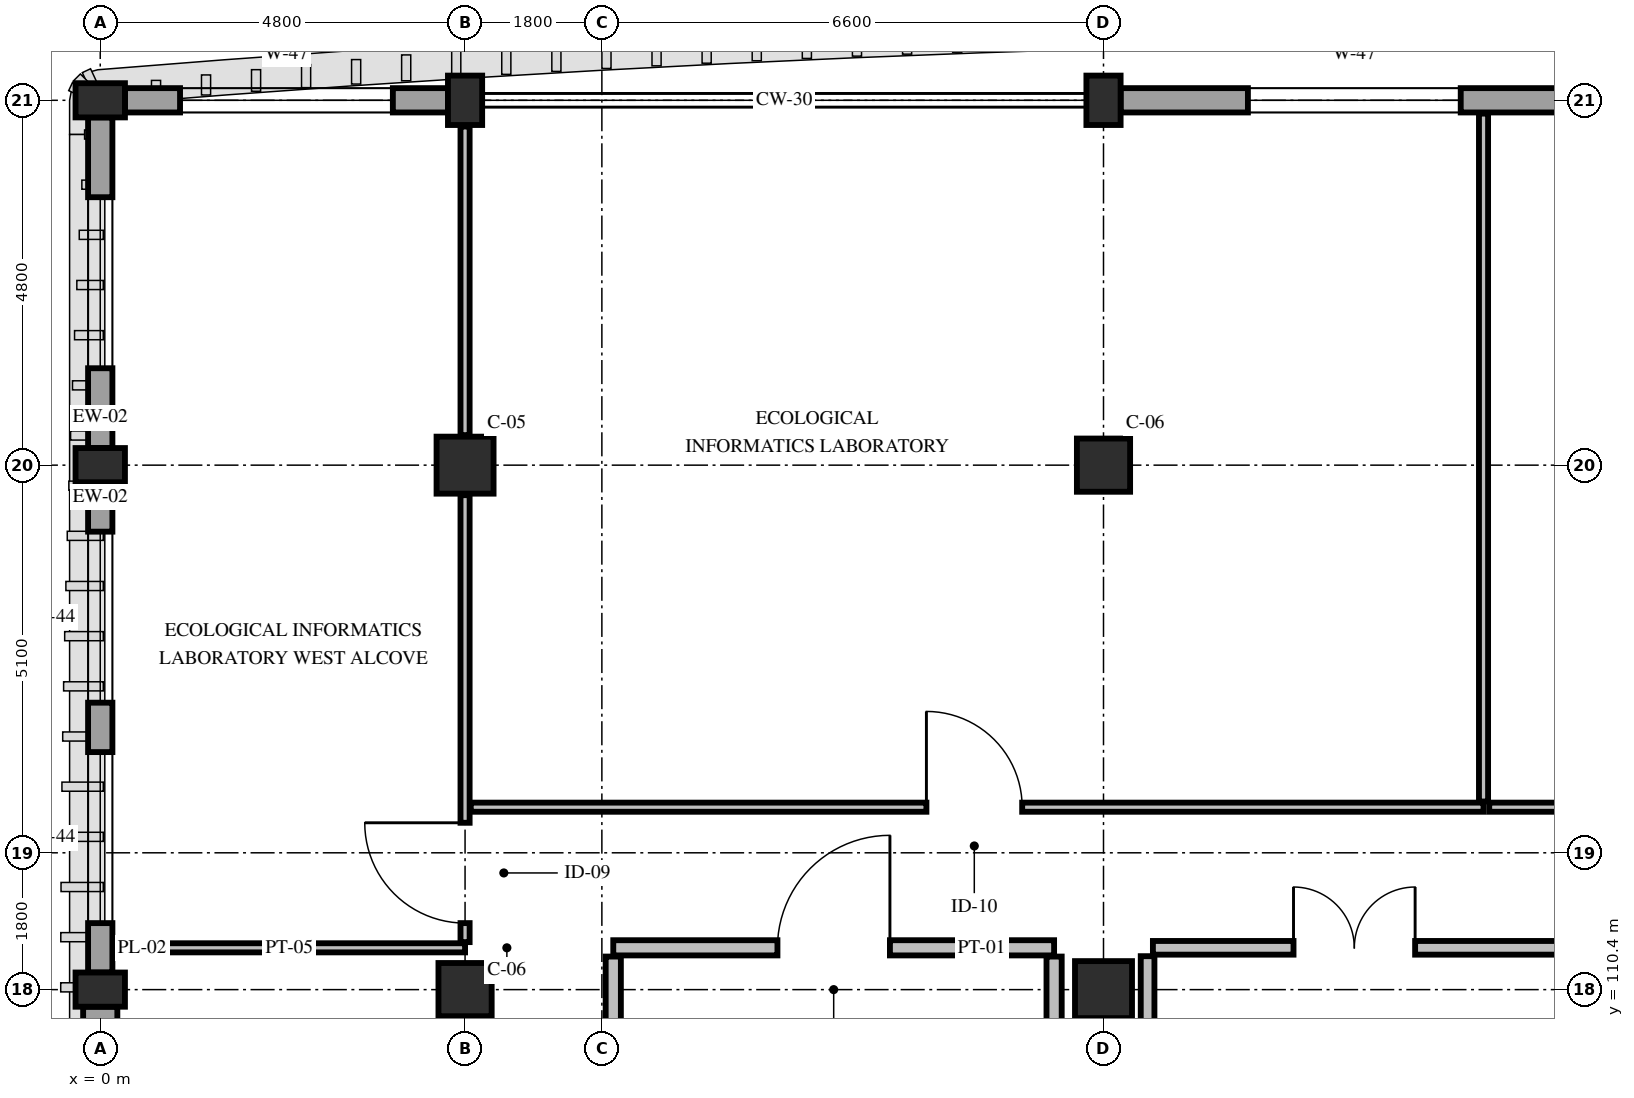
"""IFC4 building model, lengths in metres.
Left out: names, types, materials, properties, quantities, classifications, styles, units other than length and angle.
Written with IfcOpenShell. Run it as: python <this file> out.ifc"""

import sys

from ifc_helpers import new_model, si_unit, direction, frame, frame_2d, origin, origin_2d, place, context, subcontext, project, spatial, rectangle, extrude, element, fill, save


model = new_model("IFC4")
c1 = context("Model", 3, precision=1e-05, world=origin(), true_north=direction((0.0, 1.0)))
c2 = subcontext(c1, "Body", "Model", "MODEL_VIEW")
j1 = project(units=[si_unit("LENGTHUNIT", "METRE"), si_unit("PLANEANGLEUNIT", "RADIAN")], contexts=[c1])
p1 = place(None, origin())
s1 = spatial("IfcSite", under=j1, at=p1, CompositionType="ELEMENT")
p2 = place(p1, origin())
s2 = spatial("IfcBuilding", under=s1, at=p2, CompositionType="ELEMENT")
p3 = place(p2, frame((0.0, 0.0, 29.4)))
s3 = spatial("IfcBuildingStorey", under=s2, at=p3, CompositionType="ELEMENT", Elevation=29.4)
for number, where, z_axis, x_axis in (
    (1, (0.0, 110.4, 0.0), (0.0, 0.0, 1.0), (0.0, 1.0, 0.0)),
    (2, (0.0, 117.3, 0.0), (0.0, 0.0, 1.0), (0.0, 1.0, 0.0)),
    (3, (0.0, 122.1, 0.0), (0.0, 0.0, 1.0), (0.0, 1.0, 0.0)),
):
    element("IfcColumn", number, at=place(p3, frame(where, z_axis=z_axis, x_axis=x_axis)), inside=s3, PredefinedType="PILASTER", context=c2, shape_type="SweptSolid", body=[
        extrude(rectangle(XDim=0.45, YDim=0.65, at=origin_2d()), origin(), (0.0, 0.0, 1.0), 4.8),
    ])
p4 = place(p3, frame((4.8, 110.4, 0.0), z_axis=(0.0, 0.0, 1.0), x_axis=(1.0, 0.0, 0.0)))
e4 = element("IfcColumn", 4, at=p4, inside=s3, PredefinedType="COLUMN", context=c2, shape_type="SweptSolid", body=[
    extrude(rectangle(XDim=0.7, YDim=0.7, at=origin_2d()), origin(), (0.0, 0.0, 1.0), 4.8),
])
p5 = place(p3, frame((4.8, 117.3, 0.0), z_axis=(0.0, 0.0, 1.0), x_axis=(1.0, 0.0, 0.0)))
e5 = element("IfcColumn", 5, at=p5, inside=s3, PredefinedType="COLUMN", context=c2, shape_type="SweptSolid", body=[
    extrude(rectangle(XDim=0.75, YDim=0.75, at=origin_2d()), origin(), (0.0, 0.0, 1.0), 4.8),
])
p6 = place(p3, frame((4.8, 122.1, 0.0), z_axis=(0.0, 0.0, 1.0), x_axis=(1.0, 0.0, 0.0)))
e6 = element("IfcColumn", 6, at=p6, inside=s3, PredefinedType="PILASTER", context=c2, shape_type="SweptSolid", body=[
    extrude(rectangle(XDim=0.45, YDim=0.65, at=origin_2d()), origin(), (0.0, 0.0, 1.0), 4.8),
])
p7 = place(p3, frame((13.2, 110.4, 0.0), z_axis=(0.0, 0.0, 1.0), x_axis=(1.0, 0.0, 0.0)))
e7 = element("IfcColumn", 7, at=p7, inside=s3, PredefinedType="COLUMN", context=c2, shape_type="SweptSolid", body=[
    extrude(rectangle(XDim=0.75, YDim=0.75, at=origin_2d()), origin(), (0.0, 0.0, 1.0), 4.8),
])
p8 = place(p3, frame((13.2, 117.3, 0.0), z_axis=(0.0, 0.0, 1.0), x_axis=(1.0, 0.0, 0.0)))
e8 = element("IfcColumn", 8, at=p8, inside=s3, PredefinedType="COLUMN", context=c2, shape_type="SweptSolid", body=[
    extrude(rectangle(XDim=0.7, YDim=0.7, at=origin_2d()), origin(), (0.0, 0.0, 1.0), 4.8),
])
p9 = place(p3, frame((13.2, 122.1, 0.0), z_axis=(0.0, 0.0, 1.0), x_axis=(1.0, 0.0, 0.0)))
e9 = element("IfcColumn", 9, at=p9, inside=s3, PredefinedType="PILASTER", context=c2, shape_type="SweptSolid", body=[
    extrude(rectangle(XDim=0.45, YDim=0.65, at=origin_2d()), origin(), (0.0, 0.0, 1.0), 4.8),
])
p10 = place(p3, frame((0.0, 104.025, 0.0), z_axis=(0.0, 0.0, 1.0), x_axis=(0.0, 1.0, 0.0)))
e10 = element("IfcWall", 10, at=p10, inside=s3, PredefinedType="SOLIDWALL", context=c2, shape_type="SweptSolid", body=[
    extrude(rectangle(XDim=6.15, YDim=0.45, at=frame_2d((3.075, 0.0))), origin(), (0.0, 0.0, 1.0), 3.95),
])
p11 = place(p3, frame((0.0, 110.625, 0.0), z_axis=(0.0, 0.0, 1.0), x_axis=(0.0, 1.0, 0.0)))
e11 = element("IfcWall", 11, at=p11, inside=s3, PredefinedType="STANDARD", context=c2, shape_type="SweptSolid", body=[
    extrude(rectangle(XDim=6.45, YDim=0.32, at=frame_2d((3.225, 0.0))), origin(), (0.0, 0.0, 1.0), 3.95),
])
p12 = place(p11, frame((0.65, 0.0, 0.85)))
e12 = element("IfcOpeningElement", 12, at=p12, cuts=e11, PredefinedType="OPENING", context=c2, shape_type="SweptSolid", body=[
    extrude(rectangle(XDim=2.25, YDim=2.24, at=frame_2d((1.125, 1.12))), frame((0.0, 0.175, 0.0), z_axis=(0.0, -1.0, 0.0), x_axis=(1.0, 0.0, 0.0)), (0.0, 0.0, 1.0), 0.35),
])
p13 = place(p11, frame((3.55, 0.0, 0.85)))
e13 = element("IfcOpeningElement", 13, at=p13, cuts=e11, PredefinedType="OPENING", context=c2, shape_type="SweptSolid", body=[
    extrude(rectangle(XDim=2.25, YDim=2.24, at=frame_2d((1.125, 1.12))), frame((0.0, 0.175, 0.0), z_axis=(0.0, -1.0, 0.0), x_axis=(1.0, 0.0, 0.0)), (0.0, 0.0, 1.0), 0.35),
])
p14 = place(p3, frame((0.0, 117.525, 0.0), z_axis=(0.0, 0.0, 1.0), x_axis=(0.0, 1.0, 0.0)))
e14 = element("IfcWall", 14, at=p14, inside=s3, PredefinedType="STANDARD", context=c2, shape_type="SweptSolid", body=[
    extrude(rectangle(XDim=4.35, YDim=0.32, at=frame_2d((2.175, 0.0))), origin(), (0.0, 0.0, 1.0), 3.95),
])
p15 = place(p14, frame((1.05, 0.0, 0.85)))
e15 = element("IfcOpeningElement", 15, at=p15, cuts=e14, PredefinedType="OPENING", context=c2, shape_type="SweptSolid", body=[
    extrude(rectangle(XDim=2.25, YDim=2.24, at=frame_2d((1.125, 1.12))), frame((0.0, 0.175, 0.0), z_axis=(0.0, -1.0, 0.0), x_axis=(1.0, 0.0, 0.0)), (0.0, 0.0, 1.0), 0.35),
])
p16 = place(p3, frame((0.325, 122.1, 0.0), z_axis=(0.0, 0.0, 1.0), x_axis=(1.0, 0.0, 0.0)))
e16 = element("IfcWall", 16, at=p16, inside=s3, PredefinedType="STANDARD", context=c2, shape_type="SweptSolid", body=[
    extrude(rectangle(XDim=4.25, YDim=0.32, at=frame_2d((2.125, 0.0))), origin(), (0.0, 0.0, 1.0), 3.95),
])
p17 = place(p16, frame((0.725, 0.0, 0.85)))
e17 = element("IfcOpeningElement", 17, at=p17, cuts=e16, PredefinedType="OPENING", context=c2, shape_type="SweptSolid", body=[
    extrude(rectangle(XDim=2.8, YDim=2.08, at=frame_2d((1.4, 1.04))), frame((0.0, 0.175, 0.0), z_axis=(0.0, -1.0, 0.0), x_axis=(1.0, 0.0, 0.0)), (0.0, 0.0, 1.0), 0.35),
])
p18 = place(p3, frame((13.425, 122.1, 0.0), z_axis=(0.0, 0.0, 1.0), x_axis=(1.0, 0.0, 0.0)))
e18 = element("IfcWall", 18, at=p18, inside=s3, PredefinedType="STANDARD", context=c2, shape_type="SweptSolid", body=[
    extrude(rectangle(XDim=6.15, YDim=0.32, at=frame_2d((3.075, 0.0))), origin(), (0.0, 0.0, 1.0), 3.93),
])
p19 = place(p18, frame((1.675, 0.0, 0.85)))
e19 = element("IfcOpeningElement", 19, at=p19, cuts=e18, PredefinedType="OPENING", context=c2, shape_type="SweptSolid", body=[
    extrude(rectangle(XDim=2.8, YDim=2.08, at=frame_2d((1.4, 1.04))), frame((0.0, 0.175, 0.0), z_axis=(0.0, -1.0, 0.0), x_axis=(1.0, 0.0, 0.0)), (0.0, 0.0, 1.0), 0.35),
])
p20 = place(p3, frame((13.85, 110.95, 0.0), z_axis=(0.0, 0.0, 1.0), x_axis=(1.0, 0.0, 0.0)))
e20 = element("IfcWall", 20, at=p20, inside=s3, PredefinedType="PARTITIONING", context=c2, shape_type="SweptSolid", body=[
    extrude(rectangle(XDim=5.47, YDim=0.18, at=frame_2d((2.735, 0.0))), origin(), (0.0, 0.0, 1.0), 4.345),
])
p21 = place(p20, frame((1.85, 0.0, 0.0)))
e21 = element("IfcOpeningElement", 21, at=p21, cuts=e20, PredefinedType="OPENING", context=c2, shape_type="SweptSolid", body=[
    extrude(rectangle(XDim=1.6, YDim=2.25, at=frame_2d((0.8, 1.125))), frame((0.0, 0.105, 0.0), z_axis=(0.0, -1.0, 0.0), x_axis=(1.0, 0.0, 0.0)), (0.0, 0.0, 1.0), 0.21),
])
p22 = place(p3, frame((13.78, 107.23, 0.0), z_axis=(0.0, 0.0, 1.0), x_axis=(0.0, 1.0, 0.0)))
e22 = element("IfcWall", 22, at=p22, inside=s3, PredefinedType="PARTITIONING", context=c2, shape_type="SweptSolid", body=[
    extrude(rectangle(XDim=3.61, YDim=0.18, at=frame_2d((1.805, 0.0))), origin(), (0.0, 0.0, 1.0), 4.18),
])
p23 = place(p3, frame((6.75, 110.95, 0.0), z_axis=(0.0, 0.0, 1.0), x_axis=(1.0, 0.0, 0.0)))
e23 = element("IfcWall", 23, at=p23, inside=s3, PredefinedType="PARTITIONING", context=c2, shape_type="SweptSolid", body=[
    extrude(rectangle(XDim=5.8, YDim=0.2, at=frame_2d((2.9, 0.0))), origin(), (0.0, 0.0, 1.0), 4.345),
])
p24 = place(p23, frame((2.16, 0.0, 0.0)))
e24 = element("IfcOpeningElement", 24, at=p24, cuts=e23, PredefinedType="OPENING", context=c2, shape_type="SweptSolid", body=[
    extrude(rectangle(XDim=1.48, YDim=2.3, at=frame_2d((0.74, 1.15))), frame((0.0, 0.115, 0.0), z_axis=(0.0, -1.0, 0.0), x_axis=(1.0, 0.0, 0.0)), (0.0, 0.0, 1.0), 0.23),
])
for number, where, z_axis, x_axis in (
    (25, (6.75, 104.615, 0.0), (0.0, 0.0, 1.0), (0.0, 1.0, 0.0)),
    (26, (12.55, 104.615, 0.0), (0.0, 0.0, 1.0), (0.0, 1.0, 0.0)),
):
    element("IfcWall", number, at=place(p3, frame(where, z_axis=z_axis, x_axis=x_axis)), inside=s3, PredefinedType="PARTITIONING", context=c2, shape_type="SweptSolid", body=[
        extrude(rectangle(XDim=6.22, YDim=0.2, at=frame_2d((3.11, 0.0))), origin(), (0.0, 0.0, 1.0), 3.83),
    ])
p25 = place(p3, frame((0.175, 110.95, 0.0), z_axis=(0.0, 0.0, 1.0), x_axis=(1.0, 0.0, 0.0)))
e27 = element("IfcWall", 27, at=p25, inside=s3, PredefinedType="PARTITIONING", context=c2, shape_type="SweptSolid", body=[
    extrude(rectangle(XDim=4.625, YDim=0.12, at=frame_2d((2.312, 0.0))), origin(), (0.0, 0.0, 1.0), 4.08),
])
p26 = place(p3, frame((4.8, 111.025, 0.0), z_axis=(0.0, 0.0, 1.0), x_axis=(0.0, 1.0, 0.0)))
e28 = element("IfcWall", 28, at=p26, inside=s3, PredefinedType="PARTITIONING", context=c2, shape_type="SweptSolid", body=[
    extrude(rectangle(XDim=5.88, YDim=0.12, at=frame_2d((2.94, 0.0))), origin(), (0.0, 0.0, 1.0), 4.08),
])
p27 = place(p26, frame((0.25, 0.0, 0.0)))
e29 = element("IfcOpeningElement", 29, at=p27, cuts=e28, PredefinedType="OPENING", context=c2, shape_type="SweptSolid", body=[
    extrude(rectangle(XDim=1.32, YDim=2.2, at=frame_2d((0.66, 1.1))), frame((0.0, 0.075, 0.0), z_axis=(0.0, -1.0, 0.0), x_axis=(1.0, 0.0, 0.0)), (0.0, 0.0, 1.0), 0.15),
])
p28 = place(p3, frame((4.8, 117.695, 0.0), z_axis=(0.0, 0.0, 1.0), x_axis=(0.0, 1.0, 0.0)))
e30 = element("IfcWall", 30, at=p28, inside=s3, PredefinedType="PARTITIONING", context=c2, shape_type="SweptSolid", body=[
    extrude(rectangle(XDim=4.06, YDim=0.12, at=frame_2d((2.03, 0.0))), origin(), (0.0, 0.0, 1.0), 4.08),
])
p29 = place(p3, frame((4.875, 112.8, 0.0), z_axis=(0.0, 0.0, 1.0), x_axis=(1.0, 0.0, 0.0)))
e31 = element("IfcWall", 31, at=p29, inside=s3, PredefinedType="PARTITIONING", context=c2, shape_type="SweptSolid", body=[
    extrude(rectangle(XDim=13.325, YDim=0.12, at=frame_2d((6.663, 0.0))), origin(), (0.0, 0.0, 1.0), 4.08),
])
p30 = place(p29, frame((5.995, 0.0, 0.0)))
e32 = element("IfcOpeningElement", 32, at=p30, cuts=e31, PredefinedType="OPENING", context=c2, shape_type="SweptSolid", body=[
    extrude(rectangle(XDim=1.26, YDim=2.2, at=frame_2d((0.63, 1.1))), frame((0.0, 0.075, 0.0), z_axis=(0.0, -1.0, 0.0), x_axis=(1.0, 0.0, 0.0)), (0.0, 0.0, 1.0), 0.15),
])
p31 = place(p3, frame((18.2, 112.875, 0.0), z_axis=(0.0, 0.0, 1.0), x_axis=(0.0, 1.0, 0.0)))
e33 = element("IfcWall", 33, at=p31, inside=s3, PredefinedType="PARTITIONING", context=c2, shape_type="SweptSolid", body=[
    extrude(rectangle(XDim=9.05, YDim=0.12, at=frame_2d((4.525, 0.0))), origin(), (0.0, 0.0, 1.0), 3.93),
])
p32 = place(p3, frame((18.275, 112.8, 0.0), z_axis=(0.0, 0.0, 1.0), x_axis=(1.0, 0.0, 0.0)))
e34 = element("IfcWall", 34, at=p32, inside=s3, PredefinedType="PARTITIONING", context=c2, shape_type="SweptSolid", body=[
    extrude(rectangle(XDim=9.325, YDim=0.12, at=frame_2d((4.663, 0.0))), origin(), (0.0, 0.0, 1.0), 4.13),
])
p33 = place(p32, frame((3.905, 0.0, 0.0)))
e35 = element("IfcOpeningElement", 35, at=p33, cuts=e34, PredefinedType="OPENING", context=c2, shape_type="SweptSolid", body=[
    extrude(rectangle(XDim=1.44, YDim=2.25, at=frame_2d((0.72, 1.125))), frame((0.0, 0.075, 0.0), z_axis=(0.0, -1.0, 0.0), x_axis=(1.0, 0.0, 0.0)), (0.0, 0.0, 1.0), 0.15),
])
p34 = place(p12, origin())
e36 = element("IfcWindow", 36, at=p34, inside=s3, PartitioningType="DOUBLE_PANEL_VERTICAL", PredefinedType="WINDOW", context=c2, shape_type="SweptSolid", body=[
    extrude(rectangle(XDim=2.25, YDim=2.24, at=frame_2d((1.125, 1.12))), frame((0.0, 0.03, 0.0), z_axis=(0.0, -1.0, 0.0), x_axis=(1.0, 0.0, 0.0)), (0.0, 0.0, 1.0), 0.06),
])
fill(e12, e36)
p35 = place(p13, origin())
e37 = element("IfcWindow", 37, at=p35, inside=s3, PartitioningType="DOUBLE_PANEL_VERTICAL", PredefinedType="WINDOW", context=c2, shape_type="SweptSolid", body=[
    extrude(rectangle(XDim=2.25, YDim=2.24, at=frame_2d((1.125, 1.12))), frame((0.0, 0.03, 0.0), z_axis=(0.0, -1.0, 0.0), x_axis=(1.0, 0.0, 0.0)), (0.0, 0.0, 1.0), 0.06),
])
fill(e13, e37)
p36 = place(p15, origin())
e38 = element("IfcWindow", 38, at=p36, inside=s3, PartitioningType="DOUBLE_PANEL_VERTICAL", PredefinedType="WINDOW", context=c2, shape_type="SweptSolid", body=[
    extrude(rectangle(XDim=2.25, YDim=2.24, at=frame_2d((1.125, 1.12))), frame((0.0, 0.03, 0.0), z_axis=(0.0, -1.0, 0.0), x_axis=(1.0, 0.0, 0.0)), (0.0, 0.0, 1.0), 0.06),
])
fill(e15, e38)
p37 = place(p17, origin())
e39 = element("IfcWindow", 39, at=p37, inside=s3, PartitioningType="DOUBLE_PANEL_VERTICAL", PredefinedType="WINDOW", context=c2, shape_type="SweptSolid", body=[
    extrude(rectangle(XDim=2.8, YDim=2.08, at=frame_2d((1.4, 1.04))), frame((0.0, 0.03, 0.0), z_axis=(0.0, -1.0, 0.0), x_axis=(1.0, 0.0, 0.0)), (0.0, 0.0, 1.0), 0.06),
])
fill(e17, e39)
p38 = place(p19, origin())
e40 = element("IfcWindow", 40, at=p38, inside=s3, PartitioningType="DOUBLE_PANEL_VERTICAL", PredefinedType="WINDOW", context=c2, shape_type="SweptSolid", body=[
    extrude(rectangle(XDim=2.8, YDim=2.08, at=frame_2d((1.4, 1.04))), frame((0.0, 0.03, 0.0), z_axis=(0.0, -1.0, 0.0), x_axis=(1.0, 0.0, 0.0)), (0.0, 0.0, 1.0), 0.06),
])
fill(e19, e40)
p39 = place(p21, origin())
e41 = element("IfcDoor", 41, at=p39, inside=s3, OperationType="DOUBLE_DOOR_SINGLE_SWING", PredefinedType="DOOR", context=c2, shape_type="SweptSolid", body=[
    extrude(rectangle(XDim=1.6, YDim=2.25, at=frame_2d((0.8, 1.125))), frame((0.0, 0.025, 0.0), z_axis=(0.0, -1.0, 0.0), x_axis=(1.0, 0.0, 0.0)), (0.0, 0.0, 1.0), 0.05),
])
fill(e21, e41)
p40 = place(p24, origin())
e42 = element("IfcDoor", 42, at=p40, inside=s3, OperationType="SINGLE_SWING_RIGHT", PredefinedType="DOOR", context=c2, shape_type="SweptSolid", body=[
    extrude(rectangle(XDim=1.48, YDim=2.3, at=frame_2d((0.74, 1.15))), frame((0.0, 0.025, 0.0), z_axis=(0.0, -1.0, 0.0), x_axis=(1.0, 0.0, 0.0)), (0.0, 0.0, 1.0), 0.05),
])
fill(e24, e42)
p41 = place(p27, origin())
e43 = element("IfcDoor", 43, at=p41, inside=s3, OperationType="SINGLE_SWING_RIGHT", PredefinedType="DOOR", context=c2, shape_type="SweptSolid", body=[
    extrude(rectangle(XDim=1.32, YDim=2.2, at=frame_2d((0.66, 1.1))), frame((0.0, 0.025, 0.0), z_axis=(0.0, -1.0, 0.0), x_axis=(1.0, 0.0, 0.0)), (0.0, 0.0, 1.0), 0.05),
])
fill(e29, e43)
p42 = place(p30, origin())
e44 = element("IfcDoor", 44, at=p42, inside=s3, OperationType="SINGLE_SWING_LEFT", PredefinedType="DOOR", context=c2, shape_type="SweptSolid", body=[
    extrude(rectangle(XDim=1.26, YDim=2.2, at=frame_2d((0.63, 1.1))), frame((0.0, 0.025, 0.0), z_axis=(0.0, -1.0, 0.0), x_axis=(1.0, 0.0, 0.0)), (0.0, 0.0, 1.0), 0.05),
])
fill(e32, e44)
save(model, sys.argv[1])
